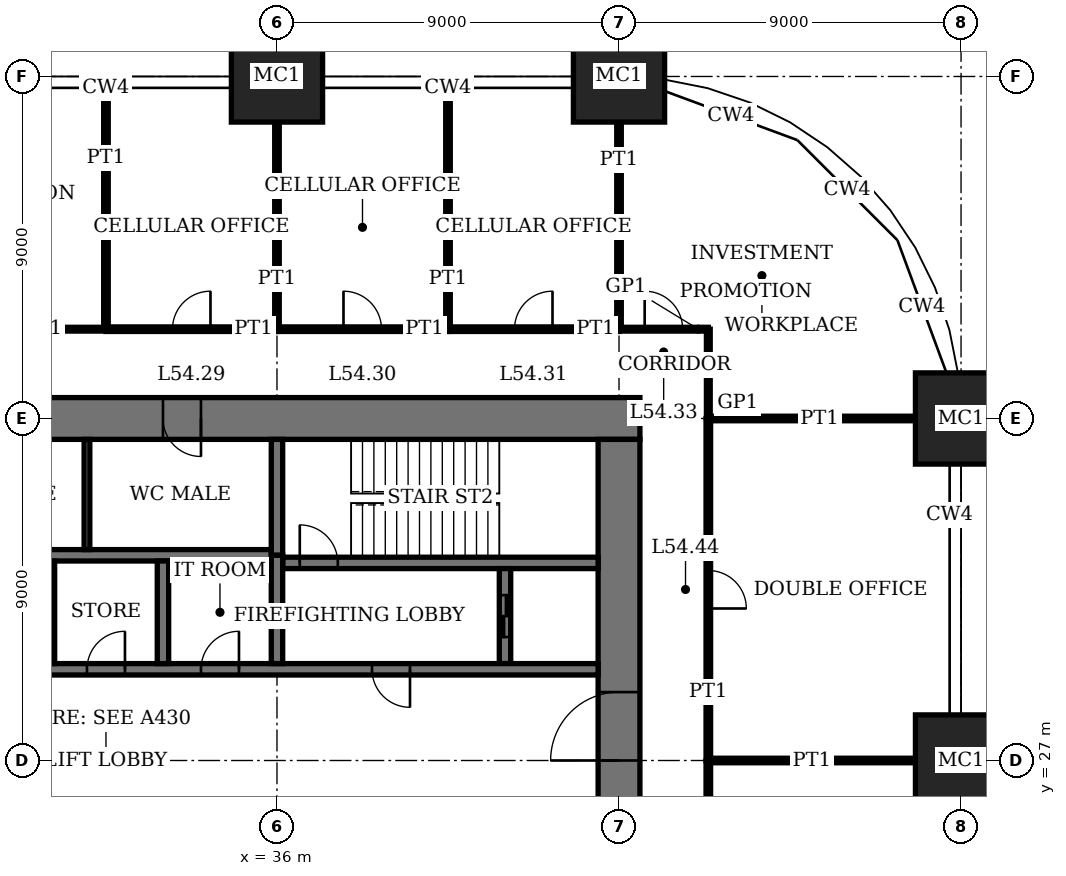
"""IFC4 building model, lengths in metres.
Left out: names, types, materials, properties, quantities, classifications, styles, units other than length and angle.
Written with IfcOpenShell. Run it as: python <this file> out.ifc"""

import sys

from ifc_helpers import new_model, si_unit, direction, frame, frame_2d, origin, origin_2d, place, context, subcontext, project, spatial, rectangle, extrude, element, fill, save


model = new_model("IFC4")
c1 = context("Model", 3, precision=1e-05, world=origin(), true_north=direction((0.0, 1.0)))
c2 = subcontext(c1, "Body", "Model", "MODEL_VIEW")
j1 = project(units=[si_unit("LENGTHUNIT", "METRE"), si_unit("PLANEANGLEUNIT", "RADIAN")], contexts=[c1])
p1 = place(None, origin())
s1 = spatial("IfcSite", under=j1, at=p1, CompositionType="ELEMENT")
p2 = place(p1, origin())
s2 = spatial("IfcBuilding", under=s1, at=p2, CompositionType="ELEMENT")
p3 = place(p2, frame((0.0, 0.0, 222.2)))
s3 = spatial("IfcBuildingStorey", under=s2, at=p3, CompositionType="ELEMENT", Elevation=222.2)
for number, where, z_axis, x_axis in (
    (1, (36.0, 45.0, 0.0), (0.0, 0.0, 1.0), (1.0, 0.0, 0.0)),
    (2, (45.0, 45.0, 0.0), (0.0, 0.0, 1.0), (1.0, 0.0, 0.0)),
    (3, (54.0, 27.0, 0.0), (0.0, 0.0, 1.0), (1.0, 0.0, 0.0)),
    (4, (54.0, 36.0, 0.0), (0.0, 0.0, 1.0), (1.0, 0.0, 0.0)),
):
    element("IfcColumn", number, at=place(p3, frame(where, z_axis=z_axis, x_axis=x_axis)), inside=s3, PredefinedType="COLUMN", context=c2, shape_type="SweptSolid", body=[
        extrude(rectangle(XDim=2.4, YDim=2.4, at=origin_2d()), origin(), (0.0, 0.0, 1.0), 4.0),
    ])
p4 = place(p3, frame((45.55, 36.0, 0.0), z_axis=(0.0, 0.0, 1.0), x_axis=(-1.0, 0.0, 0.0)))
e5 = element("IfcWall", 5, at=p4, inside=s3, PredefinedType="SHEAR", context=c2, shape_type="SweptSolid", body=[
    extrude(rectangle(XDim=28.1, YDim=1.1, at=frame_2d((14.05, 0.0))), origin(), (0.0, 0.0, 1.0), 4.0),
])
p5 = place(p4, frame((11.55, 0.0, 0.0)))
e6 = element("IfcOpeningElement", 6, at=p5, cuts=e5, PredefinedType="OPENING", context=c2, shape_type="SweptSolid", body=[
    extrude(rectangle(XDim=1.0, YDim=2.4, at=frame_2d((0.5, 1.2))), frame((0.0, 0.56, 0.0), z_axis=(0.0, -1.0, 0.0), x_axis=(1.0, 0.0, 0.0)), (0.0, 0.0, 1.0), 1.12),
])
p6 = place(p4, frame((16.55, 0.0, 0.0)))
e7 = element("IfcOpeningElement", 7, at=p6, cuts=e5, PredefinedType="OPENING", context=c2, shape_type="SweptSolid", body=[
    extrude(rectangle(XDim=1.0, YDim=2.4, at=frame_2d((0.5, 1.2))), frame((0.0, 0.56, 0.0), z_axis=(0.0, -1.0, 0.0), x_axis=(1.0, 0.0, 0.0)), (0.0, 0.0, 1.0), 1.12),
])
p7 = place(p4, frame((20.0, 0.0, 0.0)))
e8 = element("IfcOpeningElement", 8, at=p7, cuts=e5, PredefinedType="OPENING", context=c2, shape_type="SweptSolid", body=[
    extrude(rectangle(XDim=1.1, YDim=2.4, at=frame_2d((0.55, 1.2))), frame((0.0, 0.56, 0.0), z_axis=(0.0, -1.0, 0.0), x_axis=(1.0, 0.0, 0.0)), (0.0, 0.0, 1.0), 1.12),
])
p8 = place(p4, frame((24.05, 0.0, 0.0)))
e9 = element("IfcOpeningElement", 9, at=p8, cuts=e5, PredefinedType="OPENING", context=c2, shape_type="SweptSolid", body=[
    extrude(rectangle(XDim=1.0, YDim=2.4, at=frame_2d((0.5, 1.2))), frame((0.0, 0.56, 0.0), z_axis=(0.0, -1.0, 0.0), x_axis=(1.0, 0.0, 0.0)), (0.0, 0.0, 1.0), 1.12),
])
p9 = place(p3, frame((45.0, 18.55, 0.0), z_axis=(0.0, 0.0, 1.0), x_axis=(0.0, 1.0, 0.0)))
e10 = element("IfcWall", 10, at=p9, inside=s3, PredefinedType="SHEAR", context=c2, shape_type="SweptSolid", body=[
    extrude(rectangle(XDim=16.9, YDim=1.1, at=frame_2d((8.45, 0.0))), origin(), (0.0, 0.0, 1.0), 4.0),
])
p10 = place(p9, frame((8.45, 0.0, 0.0)))
e11 = element("IfcOpeningElement", 11, at=p10, cuts=e10, PredefinedType="OPENING", context=c2, shape_type="SweptSolid", body=[
    extrude(rectangle(XDim=1.8, YDim=2.4, at=frame_2d((0.9, 1.2))), frame((0.0, 0.56, 0.0), z_axis=(0.0, -1.0, 0.0), x_axis=(1.0, 0.0, 0.0)), (0.0, 0.0, 1.0), 1.12),
])
p11 = place(p3, frame((36.15, 32.2, 0.0), z_axis=(0.0, 0.0, 1.0), x_axis=(1.0, 0.0, 0.0)))
e12 = element("IfcWall", 12, at=p11, inside=s3, PredefinedType="SHEAR", context=c2, shape_type="SweptSolid", body=[
    extrude(rectangle(XDim=8.3, YDim=0.3, at=frame_2d((4.15, 0.0))), origin(), (0.0, 0.0, 1.0), 4.0),
])
p12 = place(p11, frame((0.45, 0.0, 0.0)))
e13 = element("IfcOpeningElement", 13, at=p12, cuts=e12, PredefinedType="OPENING", context=c2, shape_type="SweptSolid", body=[
    extrude(rectangle(XDim=1.0, YDim=2.4, at=frame_2d((0.5, 1.2))), frame((0.0, 0.16, 0.0), z_axis=(0.0, -1.0, 0.0), x_axis=(1.0, 0.0, 0.0)), (0.0, 0.0, 1.0), 0.32),
])
p13 = place(p3, frame((36.0, 32.4, 0.0), z_axis=(0.0, 0.0, 1.0), x_axis=(0.0, 1.0, 0.0)))
e14 = element("IfcWall", 14, at=p13, inside=s3, PredefinedType="SHEAR", context=c2, shape_type="SweptSolid", body=[
    extrude(rectangle(XDim=3.05, YDim=0.3, at=frame_2d((1.525, 0.0))), origin(), (0.0, 0.0, 1.0), 4.0),
])
p14 = place(p3, frame((42.0, 29.55, 0.0), z_axis=(0.0, 0.0, 1.0), x_axis=(0.0, 1.0, 0.0)))
e15 = element("IfcWall", 15, at=p14, inside=s3, PredefinedType="SHEAR", context=c2, shape_type="SweptSolid", body=[
    extrude(rectangle(XDim=2.5, YDim=0.3, at=frame_2d((1.25, 0.0))), origin(), (0.0, 0.0, 1.0), 4.0),
])
p15 = place(p14, frame((0.7, 0.0, 0.0)))
e16 = element("IfcOpeningElement", 16, at=p15, cuts=e15, PredefinedType="OPENING", context=c2, shape_type="SweptSolid", body=[
    extrude(rectangle(XDim=1.1, YDim=2.4, at=frame_2d((0.55, 1.2))), frame((0.0, 0.16, 0.0), z_axis=(0.0, -1.0, 0.0), x_axis=(1.0, 0.0, 0.0)), (0.0, 0.0, 1.0), 0.32),
])
p16 = place(p3, frame((18.55, 29.4, 0.0), z_axis=(0.0, 0.0, 1.0), x_axis=(1.0, 0.0, 0.0)))
e17 = element("IfcWall", 17, at=p16, inside=s3, PredefinedType="SHEAR", context=c2, shape_type="SweptSolid", body=[
    extrude(rectangle(XDim=25.9, YDim=0.3, at=frame_2d((12.95, 0.0))), origin(), (0.0, 0.0, 1.0), 4.0),
])
p17 = place(p16, frame((19.95, 0.0, 0.0)))
e18 = element("IfcOpeningElement", 18, at=p17, cuts=e17, PredefinedType="OPENING", context=c2, shape_type="SweptSolid", body=[
    extrude(rectangle(XDim=1.0, YDim=2.4, at=frame_2d((0.5, 1.2))), frame((0.0, 0.16, 0.0), z_axis=(0.0, -1.0, 0.0), x_axis=(1.0, 0.0, 0.0)), (0.0, 0.0, 1.0), 0.32),
])
p18 = place(p16, frame((0.5, 0.0, 0.0)))
e19 = element("IfcOpeningElement", 19, at=p18, cuts=e17, PredefinedType="OPENING", context=c2, shape_type="SweptSolid", body=[
    extrude(rectangle(XDim=0.9, YDim=2.1, at=frame_2d((0.45, 1.05))), frame((0.0, 0.16, 0.0), z_axis=(0.0, -1.0, 0.0), x_axis=(1.0, 0.0, 0.0)), (0.0, 0.0, 1.0), 0.32),
])
p19 = place(p16, frame((15.45, 0.0, 0.0)))
e20 = element("IfcOpeningElement", 20, at=p19, cuts=e17, PredefinedType="OPENING", context=c2, shape_type="SweptSolid", body=[
    extrude(rectangle(XDim=1.0, YDim=2.4, at=frame_2d((0.5, 1.2))), frame((0.0, 0.16, 0.0), z_axis=(0.0, -1.0, 0.0), x_axis=(1.0, 0.0, 0.0)), (0.0, 0.0, 1.0), 0.32),
])
p20 = place(p16, frame((12.45, 0.0, 0.0)))
e21 = element("IfcOpeningElement", 21, at=p20, cuts=e17, PredefinedType="OPENING", context=c2, shape_type="SweptSolid", body=[
    extrude(rectangle(XDim=1.0, YDim=2.4, at=frame_2d((0.5, 1.2))), frame((0.0, 0.16, 0.0), z_axis=(0.0, -1.0, 0.0), x_axis=(1.0, 0.0, 0.0)), (0.0, 0.0, 1.0), 0.32),
])
p21 = place(p16, frame((9.4, 0.0, 0.0)))
e22 = element("IfcOpeningElement", 22, at=p21, cuts=e17, PredefinedType="OPENING", context=c2, shape_type="SweptSolid", body=[
    extrude(rectangle(XDim=1.1, YDim=2.4, at=frame_2d((0.55, 1.2))), frame((0.0, 0.16, 0.0), z_axis=(0.0, -1.0, 0.0), x_axis=(1.0, 0.0, 0.0)), (0.0, 0.0, 1.0), 0.32),
])
p22 = place(p16, frame((6.4, 0.0, 0.0)))
e23 = element("IfcOpeningElement", 23, at=p22, cuts=e17, PredefinedType="OPENING", context=c2, shape_type="SweptSolid", body=[
    extrude(rectangle(XDim=1.1, YDim=2.4, at=frame_2d((0.55, 1.2))), frame((0.0, 0.16, 0.0), z_axis=(0.0, -1.0, 0.0), x_axis=(1.0, 0.0, 0.0)), (0.0, 0.0, 1.0), 0.32),
])
p23 = place(p16, frame((3.3, 0.0, 0.0)))
e24 = element("IfcOpeningElement", 24, at=p23, cuts=e17, PredefinedType="OPENING", context=c2, shape_type="SweptSolid", body=[
    extrude(rectangle(XDim=1.3, YDim=2.4, at=frame_2d((0.65, 1.2))), frame((0.0, 0.16, 0.0), z_axis=(0.0, -1.0, 0.0), x_axis=(1.0, 0.0, 0.0)), (0.0, 0.0, 1.0), 0.32),
])
p24 = place(p3, frame((18.55, 32.4, 0.0), z_axis=(0.0, 0.0, 1.0), x_axis=(1.0, 0.0, 0.0)))
e25 = element("IfcWall", 25, at=p24, inside=s3, PredefinedType="SHEAR", context=c2, shape_type="SweptSolid", body=[
    extrude(rectangle(XDim=17.3, YDim=0.3, at=frame_2d((8.65, 0.0))), origin(), (0.0, 0.0, 1.0), 4.0),
])
for number, where, z_axis, x_axis in (
    (26, (33.0, 29.55, 0.0), (0.0, 0.0, 1.0), (0.0, 1.0, 0.0)),
    (27, (30.0, 29.55, 0.0), (0.0, 0.0, 1.0), (0.0, 1.0, 0.0)),
):
    element("IfcWall", number, at=place(p3, frame(where, z_axis=z_axis, x_axis=x_axis)), inside=s3, PredefinedType="SHEAR", context=c2, shape_type="SweptSolid", body=[
        extrude(rectangle(XDim=2.7, YDim=0.3, at=frame_2d((1.35, 0.0))), origin(), (0.0, 0.0, 1.0), 4.0),
    ])
p25 = place(p3, frame((36.0, 29.55, 0.0), z_axis=(0.0, 0.0, 1.0), x_axis=(0.0, 1.0, 0.0)))
e28 = element("IfcWall", 28, at=p25, inside=s3, PredefinedType="SHEAR", context=c2, shape_type="SweptSolid", body=[
    extrude(rectangle(XDim=2.85, YDim=0.3, at=frame_2d((1.425, 0.0))), origin(), (0.0, 0.0, 1.0), 4.0),
])
for number, where, z_axis, x_axis in (
    (29, (47.35, 27.0, 0.0), (0.0, 0.0, 1.0), (1.0, 0.0, 0.0)),
    (30, (47.35, 36.0, 0.0), (0.0, 0.0, 1.0), (1.0, 0.0, 0.0)),
):
    element("IfcWall", number, at=place(p3, frame(where, z_axis=z_axis, x_axis=x_axis)), inside=s3, PredefinedType="PARTITIONING", context=c2, shape_type="SweptSolid", body=[
        extrude(rectangle(XDim=5.45, YDim=0.12, at=frame_2d((2.725, 0.0))), origin(), (0.0, 0.0, 1.0), 3.05),
    ])
p26 = place(p3, frame((31.5, 38.35, 0.0), z_axis=(0.0, 0.0, 1.0), x_axis=(1.0, 0.0, 0.0)))
e31 = element("IfcWall", 31, at=p26, inside=s3, PredefinedType="PARTITIONING", context=c2, shape_type="SweptSolid", body=[
    extrude(rectangle(XDim=4.5, YDim=0.12, at=frame_2d((2.25, 0.0))), origin(), (0.0, 0.0, 1.0), 3.75),
])
p27 = place(p26, frame((1.75, 0.0, 0.0)))
e32 = element("IfcOpeningElement", 32, at=p27, cuts=e31, PredefinedType="OPENING", context=c2, shape_type="SweptSolid", body=[
    extrude(rectangle(XDim=1.0, YDim=2.4, at=frame_2d((0.5, 1.2))), frame((0.0, 0.07, 0.0), z_axis=(0.0, -1.0, 0.0), x_axis=(1.0, 0.0, 0.0)), (0.0, 0.0, 1.0), 0.14),
])
p28 = place(p3, frame((36.0, 38.35, 0.0), z_axis=(0.0, 0.0, 1.0), x_axis=(1.0, 0.0, 0.0)))
e33 = element("IfcWall", 33, at=p28, inside=s3, PredefinedType="PARTITIONING", context=c2, shape_type="SweptSolid", body=[
    extrude(rectangle(XDim=4.5, YDim=0.12, at=frame_2d((2.25, 0.0))), origin(), (0.0, 0.0, 1.0), 3.75),
])
p29 = place(p28, frame((1.75, 0.0, 0.0)))
e34 = element("IfcOpeningElement", 34, at=p29, cuts=e33, PredefinedType="OPENING", context=c2, shape_type="SweptSolid", body=[
    extrude(rectangle(XDim=1.0, YDim=2.4, at=frame_2d((0.5, 1.2))), frame((0.0, 0.07, 0.0), z_axis=(0.0, -1.0, 0.0), x_axis=(1.0, 0.0, 0.0)), (0.0, 0.0, 1.0), 0.14),
])
p30 = place(p3, frame((40.5, 38.35, 0.0), z_axis=(0.0, 0.0, 1.0), x_axis=(1.0, 0.0, 0.0)))
e35 = element("IfcWall", 35, at=p30, inside=s3, PredefinedType="PARTITIONING", context=c2, shape_type="SweptSolid", body=[
    extrude(rectangle(XDim=4.5, YDim=0.12, at=frame_2d((2.25, 0.0))), origin(), (0.0, 0.0, 1.0), 3.75),
])
p31 = place(p30, frame((1.75, 0.0, 0.0)))
e36 = element("IfcOpeningElement", 36, at=p31, cuts=e35, PredefinedType="OPENING", context=c2, shape_type="SweptSolid", body=[
    extrude(rectangle(XDim=1.0, YDim=2.4, at=frame_2d((0.5, 1.2))), frame((0.0, 0.07, 0.0), z_axis=(0.0, -1.0, 0.0), x_axis=(1.0, 0.0, 0.0)), (0.0, 0.0, 1.0), 0.14),
])
p32 = place(p3, frame((22.5, 38.35, 0.0), z_axis=(0.0, 0.0, 1.0), x_axis=(1.0, 0.0, 0.0)))
e37 = element("IfcWall", 37, at=p32, inside=s3, PredefinedType="PARTITIONING", context=c2, shape_type="SweptSolid", body=[
    extrude(rectangle(XDim=9.0, YDim=0.1, at=frame_2d((4.5, 0.0))), origin(), (0.0, 0.0, 1.0), 3.75),
])
p33 = place(p32, frame((4.0, 0.0, 0.0)))
e38 = element("IfcOpeningElement", 38, at=p33, cuts=e37, PredefinedType="OPENING", context=c2, shape_type="SweptSolid", body=[
    extrude(rectangle(XDim=1.0, YDim=2.4, at=frame_2d((0.5, 1.2))), frame((0.0, 0.06, 0.0), z_axis=(0.0, -1.0, 0.0), x_axis=(1.0, 0.0, 0.0)), (0.0, 0.0, 1.0), 0.12),
])
p34 = place(p3, frame((45.0, 38.35, 0.0), z_axis=(0.0, 0.0, 1.0), x_axis=(1.0, 0.0, 0.0)))
e39 = element("IfcWall", 39, at=p34, inside=s3, PredefinedType="PARTITIONING", context=c2, shape_type="SweptSolid", body=[
    extrude(rectangle(XDim=2.35, YDim=0.1, at=frame_2d((1.175, 0.0))), origin(), (0.0, 0.0, 1.0), 3.75),
])
p35 = place(p34, frame((0.675, 0.0, 0.0)))
e40 = element("IfcOpeningElement", 40, at=p35, cuts=e39, PredefinedType="OPENING", context=c2, shape_type="SweptSolid", body=[
    extrude(rectangle(XDim=1.0, YDim=2.4, at=frame_2d((0.5, 1.2))), frame((0.0, 0.06, 0.0), z_axis=(0.0, -1.0, 0.0), x_axis=(1.0, 0.0, 0.0)), (0.0, 0.0, 1.0), 0.12),
])
p36 = place(p3, frame((31.5, 38.35, 0.0), z_axis=(0.0, 0.0, 1.0), x_axis=(0.0, 1.0, 0.0)))
e41 = element("IfcWall", 41, at=p36, inside=s3, PredefinedType="PARTITIONING", context=c2, shape_type="SweptSolid", body=[
    extrude(rectangle(XDim=6.34, YDim=0.12, at=frame_2d((3.17, 0.0))), origin(), (0.0, 0.0, 1.0), 3.75),
])
p37 = place(p3, frame((36.0, 38.35, 0.0), z_axis=(0.0, 0.0, 1.0), x_axis=(0.0, 1.0, 0.0)))
e42 = element("IfcWall", 42, at=p37, inside=s3, PredefinedType="PARTITIONING", context=c2, shape_type="SweptSolid", body=[
    extrude(rectangle(XDim=5.45, YDim=0.12, at=frame_2d((2.725, 0.0))), origin(), (0.0, 0.0, 1.0), 3.05),
])
p38 = place(p3, frame((40.5, 38.35, 0.0), z_axis=(0.0, 0.0, 1.0), x_axis=(0.0, 1.0, 0.0)))
e43 = element("IfcWall", 43, at=p38, inside=s3, PredefinedType="PARTITIONING", context=c2, shape_type="SweptSolid", body=[
    extrude(rectangle(XDim=6.34, YDim=0.12, at=frame_2d((3.17, 0.0))), origin(), (0.0, 0.0, 1.0), 3.75),
])
p39 = place(p3, frame((45.0, 38.35, 0.0), z_axis=(0.0, 0.0, 1.0), x_axis=(0.0, 1.0, 0.0)))
e44 = element("IfcWall", 44, at=p39, inside=s3, PredefinedType="PARTITIONING", context=c2, shape_type="SweptSolid", body=[
    extrude(rectangle(XDim=5.45, YDim=0.12, at=frame_2d((2.725, 0.0))), origin(), (0.0, 0.0, 1.0), 3.05),
])
p40 = place(p3, frame((47.35, 18.0, 0.0), z_axis=(0.0, 0.0, 1.0), x_axis=(0.0, 1.0, 0.0)))
e45 = element("IfcWall", 45, at=p40, inside=s3, PredefinedType="PARTITIONING", context=c2, shape_type="SweptSolid", body=[
    extrude(rectangle(XDim=9.0, YDim=0.12, at=frame_2d((4.5, 0.0))), origin(), (0.0, 0.0, 1.0), 3.75),
])
p41 = place(p40, frame((4.0, 0.0, 0.0)))
e46 = element("IfcOpeningElement", 46, at=p41, cuts=e45, PredefinedType="OPENING", context=c2, shape_type="SweptSolid", body=[
    extrude(rectangle(XDim=1.0, YDim=2.4, at=frame_2d((0.5, 1.2))), frame((0.0, 0.07, 0.0), z_axis=(0.0, -1.0, 0.0), x_axis=(1.0, 0.0, 0.0)), (0.0, 0.0, 1.0), 0.14),
])
p42 = place(p3, frame((47.35, 27.0, 0.0), z_axis=(0.0, 0.0, 1.0), x_axis=(0.0, 1.0, 0.0)))
e47 = element("IfcWall", 47, at=p42, inside=s3, PredefinedType="PARTITIONING", context=c2, shape_type="SweptSolid", body=[
    extrude(rectangle(XDim=9.0, YDim=0.12, at=frame_2d((4.5, 0.0))), origin(), (0.0, 0.0, 1.0), 3.75),
])
p43 = place(p42, frame((4.0, 0.0, 0.0)))
e48 = element("IfcOpeningElement", 48, at=p43, cuts=e47, PredefinedType="OPENING", context=c2, shape_type="SweptSolid", body=[
    extrude(rectangle(XDim=1.0, YDim=2.4, at=frame_2d((0.5, 1.2))), frame((0.0, 0.07, 0.0), z_axis=(0.0, -1.0, 0.0), x_axis=(1.0, 0.0, 0.0)), (0.0, 0.0, 1.0), 0.14),
])
p44 = place(p3, frame((47.35, 36.0, 0.0), z_axis=(0.0, 0.0, 1.0), x_axis=(0.0, 1.0, 0.0)))
e49 = element("IfcWall", 49, at=p44, inside=s3, PredefinedType="PARTITIONING", context=c2, shape_type="SweptSolid", body=[
    extrude(rectangle(XDim=2.35, YDim=0.1, at=frame_2d((1.175, 0.0))), origin(), (0.0, 0.0, 1.0), 3.75),
])
p45 = place(p3, frame((31.0, 32.55, 0.0), z_axis=(0.0, 0.0, 1.0), x_axis=(0.0, 1.0, 0.0)))
e50 = element("IfcWall", 50, at=p45, inside=s3, PredefinedType="PARTITIONING", context=c2, shape_type="SweptSolid", body=[
    extrude(rectangle(XDim=2.9, YDim=0.15, at=frame_2d((1.45, 0.0))), origin(), (0.0, 0.0, 1.0), 3.75),
])
p46 = place(p10, origin())
e51 = element("IfcDoor", 51, at=p46, inside=s3, OperationType="DOUBLE_DOOR_DOUBLE_SWING", PredefinedType="DOOR", context=c2, shape_type="SweptSolid", body=[
    extrude(rectangle(XDim=1.8, YDim=2.4, at=frame_2d((0.9, 1.2))), frame((0.0, 0.03, 0.0), z_axis=(0.0, -1.0, 0.0), x_axis=(1.0, 0.0, 0.0)), (0.0, 0.0, 1.0), 0.06),
    extrude(rectangle(XDim=0.04, YDim=2.4, at=frame_2d((0.02, 1.2))), frame((0.0, 0.55, 0.0), z_axis=(0.0, -1.0, 0.0), x_axis=(1.0, 0.0, 0.0)), (0.0, 0.0, 1.0), 1.1),
    extrude(rectangle(XDim=0.04, YDim=2.4, at=frame_2d((1.78, 1.2))), frame((0.0, 0.55, 0.0), z_axis=(0.0, -1.0, 0.0), x_axis=(1.0, 0.0, 0.0)), (0.0, 0.0, 1.0), 1.1),
    extrude(rectangle(XDim=1.8, YDim=0.04, at=frame_2d((0.9, 2.38))), frame((0.0, 0.55, 0.0), z_axis=(0.0, -1.0, 0.0), x_axis=(1.0, 0.0, 0.0)), (0.0, 0.0, 1.0), 1.1),
])
fill(e11, e51)
p47 = place(p5, origin())
e52 = element("IfcDoor", 52, at=p47, inside=s3, OperationType="SINGLE_SWING_RIGHT", PredefinedType="DOOR", context=c2, shape_type="SweptSolid", body=[
    extrude(rectangle(XDim=1.0, YDim=2.4, at=frame_2d((0.5, 1.2))), frame((0.0, 0.025, 0.0), z_axis=(0.0, -1.0, 0.0), x_axis=(1.0, 0.0, 0.0)), (0.0, 0.0, 1.0), 0.05),
    extrude(rectangle(XDim=0.04, YDim=2.4, at=frame_2d((0.02, 1.2))), frame((0.0, 0.4, 0.0), z_axis=(0.0, -1.0, 0.0), x_axis=(1.0, 0.0, 0.0)), (0.0, 0.0, 1.0), 0.8),
    extrude(rectangle(XDim=0.04, YDim=2.4, at=frame_2d((0.98, 1.2))), frame((0.0, 0.4, 0.0), z_axis=(0.0, -1.0, 0.0), x_axis=(1.0, 0.0, 0.0)), (0.0, 0.0, 1.0), 0.8),
    extrude(rectangle(XDim=1.0, YDim=0.04, at=frame_2d((0.5, 2.38))), frame((0.0, 0.4, 0.0), z_axis=(0.0, -1.0, 0.0), x_axis=(1.0, 0.0, 0.0)), (0.0, 0.0, 1.0), 0.8),
])
fill(e6, e52)
p48 = place(p12, origin())
e53 = element("IfcDoor", 53, at=p48, inside=s3, OperationType="SINGLE_SWING_RIGHT", PredefinedType="DOOR", context=c2, shape_type="SweptSolid", body=[
    extrude(rectangle(XDim=1.0, YDim=2.4, at=frame_2d((0.5, 1.2))), frame((0.0, 0.03, 0.0), z_axis=(0.0, -1.0, 0.0), x_axis=(1.0, 0.0, 0.0)), (0.0, 0.0, 1.0), 0.06),
])
fill(e13, e53)
p49 = place(p17, origin())
e54 = element("IfcDoor", 54, at=p49, inside=s3, OperationType="SINGLE_SWING_RIGHT", PredefinedType="DOOR", context=c2, shape_type="SweptSolid", body=[
    extrude(rectangle(XDim=1.0, YDim=2.4, at=frame_2d((0.5, 1.2))), frame((0.0, 0.03, 0.0), z_axis=(0.0, -1.0, 0.0), x_axis=(1.0, 0.0, 0.0)), (0.0, 0.0, 1.0), 0.06),
])
fill(e18, e54)
p50 = place(p27, origin())
e55 = element("IfcDoor", 55, at=p50, inside=s3, OperationType="SINGLE_SWING_LEFT", PredefinedType="DOOR", context=c2, shape_type="SweptSolid", body=[
    extrude(rectangle(XDim=1.0, YDim=2.4, at=frame_2d((0.5, 1.2))), frame((0.0, 0.025, 0.0), z_axis=(0.0, -1.0, 0.0), x_axis=(1.0, 0.0, 0.0)), (0.0, 0.0, 1.0), 0.05),
])
fill(e32, e55)
p51 = place(p29, origin())
e56 = element("IfcDoor", 56, at=p51, inside=s3, OperationType="SINGLE_SWING_RIGHT", PredefinedType="DOOR", context=c2, shape_type="SweptSolid", body=[
    extrude(rectangle(XDim=1.0, YDim=2.4, at=frame_2d((0.5, 1.2))), frame((0.0, 0.025, 0.0), z_axis=(0.0, -1.0, 0.0), x_axis=(1.0, 0.0, 0.0)), (0.0, 0.0, 1.0), 0.05),
])
fill(e34, e56)
p52 = place(p31, origin())
e57 = element("IfcDoor", 57, at=p52, inside=s3, OperationType="SINGLE_SWING_LEFT", PredefinedType="DOOR", context=c2, shape_type="SweptSolid", body=[
    extrude(rectangle(XDim=1.0, YDim=2.4, at=frame_2d((0.5, 1.2))), frame((0.0, 0.025, 0.0), z_axis=(0.0, -1.0, 0.0), x_axis=(1.0, 0.0, 0.0)), (0.0, 0.0, 1.0), 0.05),
])
fill(e36, e57)
p53 = place(p35, origin())
e58 = element("IfcDoor", 58, at=p53, inside=s3, OperationType="SINGLE_SWING_RIGHT", PredefinedType="DOOR", context=c2, shape_type="SweptSolid", body=[
    extrude(rectangle(XDim=1.0, YDim=2.4, at=frame_2d((0.5, 1.2))), frame((0.0, 0.02, 0.0), z_axis=(0.0, -1.0, 0.0), x_axis=(1.0, 0.0, 0.0)), (0.0, 0.0, 1.0), 0.04),
])
fill(e40, e58)
p54 = place(p43, origin())
e59 = element("IfcDoor", 59, at=p54, inside=s3, OperationType="SINGLE_SWING_LEFT", PredefinedType="DOOR", context=c2, shape_type="SweptSolid", body=[
    extrude(rectangle(XDim=1.0, YDim=2.4, at=frame_2d((0.5, 1.2))), frame((0.0, 0.025, 0.0), z_axis=(0.0, -1.0, 0.0), x_axis=(1.0, 0.0, 0.0)), (0.0, 0.0, 1.0), 0.05),
])
fill(e48, e59)
p55 = place(p19, origin())
e60 = element("IfcDoor", 60, at=p55, inside=s3, OperationType="SINGLE_SWING_LEFT", PredefinedType="DOOR", context=c2, shape_type="SweptSolid", body=[
    extrude(rectangle(XDim=1.0, YDim=2.4, at=frame_2d((0.5, 1.2))), frame((0.0, 0.03, 0.0), z_axis=(0.0, -1.0, 0.0), x_axis=(1.0, 0.0, 0.0)), (0.0, 0.0, 1.0), 0.06),
])
fill(e20, e60)
p56 = place(p20, origin())
e61 = element("IfcDoor", 61, at=p56, inside=s3, OperationType="SINGLE_SWING_LEFT", PredefinedType="DOOR", context=c2, shape_type="SweptSolid", body=[
    extrude(rectangle(XDim=1.0, YDim=2.4, at=frame_2d((0.5, 1.2))), frame((0.0, 0.03, 0.0), z_axis=(0.0, -1.0, 0.0), x_axis=(1.0, 0.0, 0.0)), (0.0, 0.0, 1.0), 0.06),
])
fill(e21, e61)
p57 = place(p15, origin())
e62 = element("IfcDoor", 62, at=p57, inside=s3, OperationType="DOUBLE_DOOR_SLIDING", PredefinedType="DOOR", context=c2, shape_type="SweptSolid", body=[
    extrude(rectangle(XDim=1.1, YDim=2.4, at=frame_2d((0.55, 1.2))), frame((0.0, 0.03, 0.0), z_axis=(0.0, -1.0, 0.0), x_axis=(1.0, 0.0, 0.0)), (0.0, 0.0, 1.0), 0.06),
])
fill(e16, e62)
save(model, sys.argv[1])
